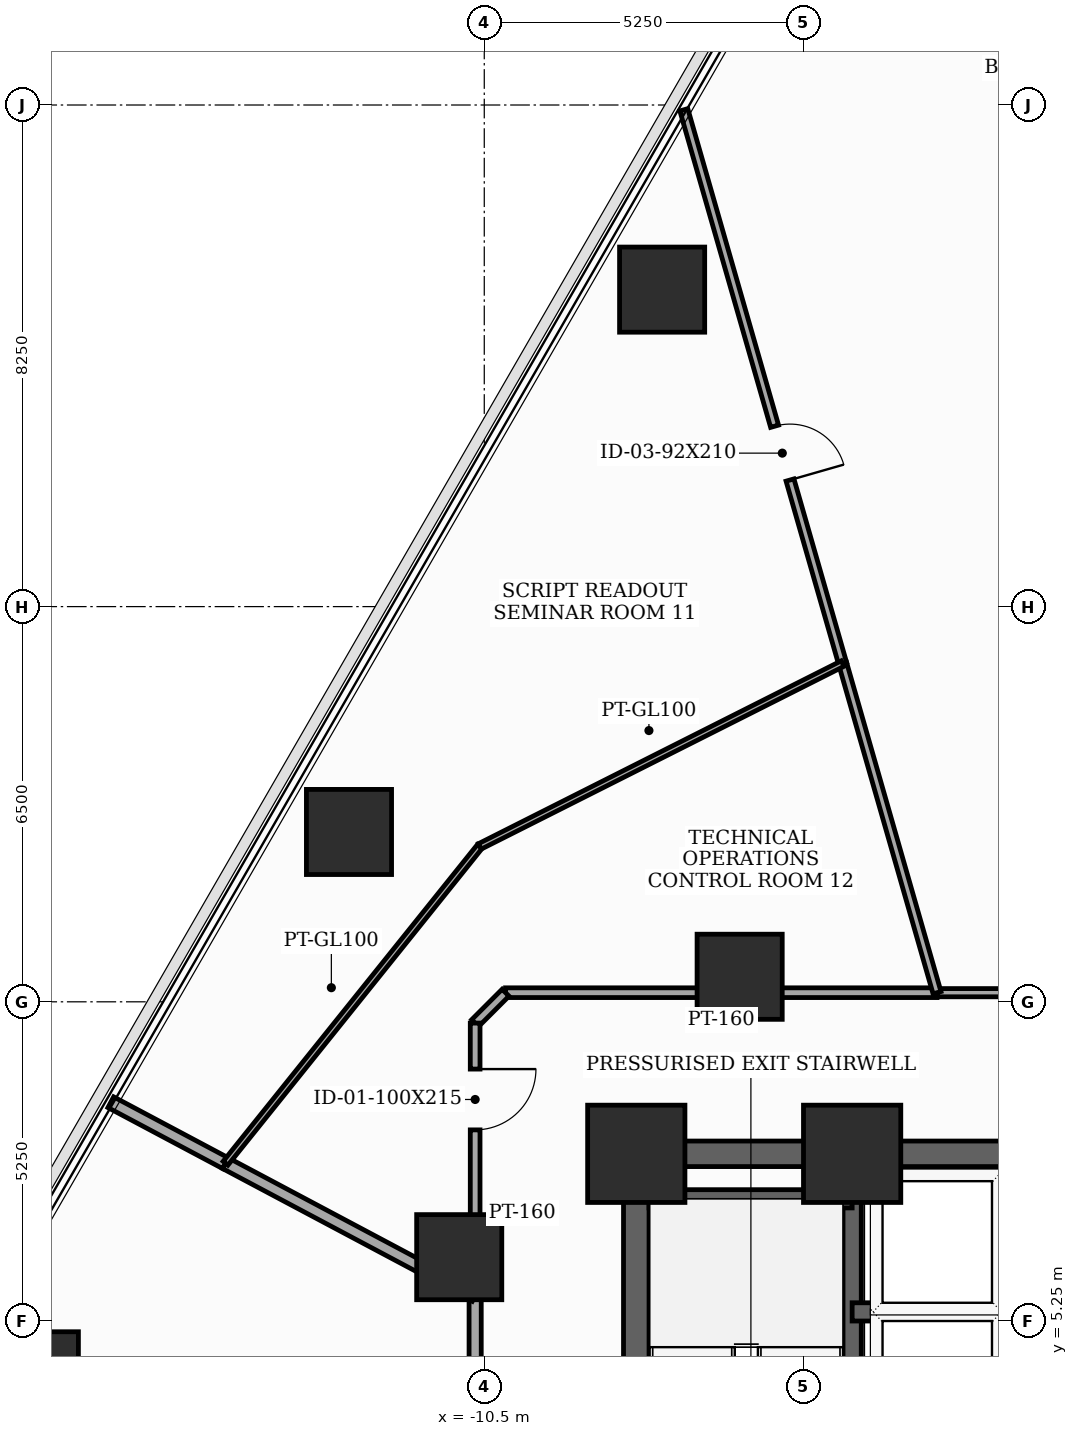
"""IFC4 building model, lengths in metres.
Left out: names, types, materials, properties, quantities, classifications, styles, units other than length and angle.
Written with IfcOpenShell. Run it as: python <this file> out.ifc"""

import sys

from ifc_helpers import new_model, si_unit, direction, frame, frame_2d, origin, origin_2d, place, context, subcontext, project, spatial, rectangle, extrude, element, fill, save


model = new_model("IFC4")
c1 = context("Model", 3, precision=1e-05, world=origin(), true_north=direction((0.0, 1.0)))
c2 = subcontext(c1, "Body", "Model", "MODEL_VIEW")
j1 = project(units=[si_unit("LENGTHUNIT", "METRE"), si_unit("PLANEANGLEUNIT", "RADIAN")], contexts=[c1])
p1 = place(None, origin())
s1 = spatial("IfcSite", under=j1, at=p1, CompositionType="ELEMENT")
p2 = place(p1, origin())
s2 = spatial("IfcBuilding", under=s1, at=p2, CompositionType="ELEMENT")
p3 = place(p2, frame((0.0, 0.0, 44.5)))
s3 = spatial("IfcBuildingStorey", under=s2, at=p3, CompositionType="ELEMENT", Elevation=44.5)
for number, where, z_axis, x_axis in (
    (1, (-4.45, 8.0, 0.0), (0.0, 0.0, 1.0), (1.0, 0.0, 0.0)),
    (2, (-8.0, 8.0, 0.0), (0.0, 0.0, 1.0), (1.0, 0.0, 0.0)),
):
    element("IfcColumn", number, at=place(p3, frame(where, z_axis=z_axis, x_axis=x_axis)), inside=s3, PredefinedType="COLUMN", context=c2, shape_type="SweptSolid", body=[
        extrude(rectangle(XDim=1.6, YDim=1.6, at=origin_2d()), origin(), (0.0, 0.0, 1.0), 3.7),
    ])
for number, where, z_axis, x_axis in (
    (3, (-6.3, 10.912, 0.0), (0.0, 0.0, 1.0), (1.0, 0.0, 0.0)),
    (4, (-10.912, 6.3, 0.0), (0.0, 0.0, 1.0), (1.0, 0.0, 0.0)),
    (5, (-7.575, 22.213, 0.0), (0.0, 0.0, 1.0), (1.0, 0.0, 0.0)),
    (6, (-12.725, 13.293, 0.0), (0.0, 0.0, 1.0), (1.0, 0.0, 0.0)),
    (7, (-17.875, 4.373, 0.0), (0.0, 0.0, 1.0), (1.0, 0.0, 0.0)),
):
    element("IfcColumn", number, at=place(p3, frame(where, z_axis=z_axis, x_axis=x_axis)), inside=s3, PredefinedType="COLUMN", context=c2, shape_type="SweptSolid", body=[
        extrude(rectangle(XDim=1.4, YDim=1.4, at=origin_2d()), origin(), (0.0, 0.0, 1.0), 3.7),
    ])
p4 = place(p3, frame((-8.0, -8.0, 0.0), z_axis=(0.0, 0.0, 1.0), x_axis=(0.0, 1.0, 0.0)))
e8 = element("IfcWall", 8, at=p4, inside=s3, PredefinedType="SHEAR", context=c2, shape_type="SweptSolid", body=[
    extrude(rectangle(XDim=16.0, YDim=0.42, at=frame_2d((8.0, 0.0))), origin(), (0.0, 0.0, 1.0), 3.5),
])
p5 = place(p4, frame((1.002, 0.0, 0.0)))
e9 = element("IfcOpeningElement", 9, at=p5, cuts=e8, PredefinedType="OPENING", context=c2, shape_type="SweptSolid", body=[
    extrude(rectangle(XDim=0.85, YDim=2.02, at=frame_2d((0.425, 1.01))), frame((0.0, 0.22, 0.0), z_axis=(0.0, -1.0, 0.0), x_axis=(1.0, 0.0, 0.0)), (0.0, 0.0, 1.0), 0.44),
])
p6 = place(p4, frame((5.35, 0.0, 0.0)))
e10 = element("IfcOpeningElement", 10, at=p6, cuts=e8, PredefinedType="OPENING", context=c2, shape_type="SweptSolid", body=[
    extrude(rectangle(XDim=1.05, YDim=2.15, at=frame_2d((0.525, 1.075))), frame((0.0, 0.22, 0.0), z_axis=(0.0, -1.0, 0.0), x_axis=(1.0, 0.0, 0.0)), (0.0, 0.0, 1.0), 0.44),
])
p7 = place(p3, frame((-8.0, 8.0, 0.0), z_axis=(0.0, 0.0, 1.0), x_axis=(1.0, 0.0, 0.0)))
e11 = element("IfcWall", 11, at=p7, inside=s3, PredefinedType="SHEAR", context=c2, shape_type="SweptSolid", body=[
    extrude(rectangle(XDim=16.0, YDim=0.42, at=frame_2d((8.0, 0.0))), origin(), (0.0, 0.0, 1.0), 3.5),
])
p8 = place(p7, frame((7.1, 0.0, 0.0)))
e12 = element("IfcOpeningElement", 12, at=p8, cuts=e11, PredefinedType="OPENING", context=c2, shape_type="SweptSolid", body=[
    extrude(rectangle(XDim=1.8, YDim=2.15, at=frame_2d((0.9, 1.075))), frame((0.0, 0.22, 0.0), z_axis=(0.0, -1.0, 0.0), x_axis=(1.0, 0.0, 0.0)), (0.0, 0.0, 1.0), 0.44),
])
p9 = place(p3, frame((-4.45, -7.79, 0.0), z_axis=(0.0, 0.0, 1.0), x_axis=(0.0, 1.0, 0.0)))
e13 = element("IfcWall", 13, at=p9, inside=s3, PredefinedType="SHEAR", context=c2, shape_type="SweptSolid", body=[
    extrude(rectangle(XDim=15.58, YDim=0.3, at=frame_2d((7.79, 0.0))), origin(), (0.0, 0.0, 1.0), 3.5),
])
p10 = place(p3, frame((-7.79, 7.26, 0.0), z_axis=(0.0, 0.0, 1.0), x_axis=(1.0, 0.0, 0.0)))
e14 = element("IfcWall", 14, at=p10, inside=s3, PredefinedType="SHEAR", context=c2, shape_type="SweptSolid", body=[
    extrude(rectangle(XDim=3.34, YDim=0.3, at=frame_2d((1.67, 0.0))), origin(), (0.0, 0.0, 1.0), 3.5),
])
p11 = place(p3, frame((-4.45, 5.4, 0.0), z_axis=(0.0, 0.0, 1.0), x_axis=(1.0, 0.0, 0.0)))
e15 = element("IfcWall", 15, at=p11, inside=s3, PredefinedType="SHEAR", context=c2, shape_type="SweptSolid", body=[
    extrude(rectangle(XDim=2.77, YDim=0.3, at=frame_2d((1.385, 0.0))), origin(), (0.0, 0.0, 1.0), 3.5),
])
p12 = place(p3, frame((1.715, 10.65, 0.0), z_axis=(0.0, 0.0, 1.0), x_axis=(-1.0, 0.0, 0.0)))
e16 = element("IfcWall", 16, at=p12, inside=s3, PredefinedType="PARTITIONING", context=c2, shape_type="SweptSolid", body=[
    extrude(rectangle(XDim=4.769, YDim=0.135, at=frame_2d((2.385, 0.0))), origin(), (0.0, 0.0, 1.0), 2.785),
])
p13 = place(p3, frame((-10.65, 5.663, 0.0), z_axis=(0.0, 0.0, 1.0), x_axis=(0.0, -1.0, 0.0)))
e17 = element("IfcWall", 17, at=p13, inside=s3, PredefinedType="SOLIDWALL", context=c2, shape_type="SweptSolid", body=[
    extrude(rectangle(XDim=7.378, YDim=0.2, at=frame_2d((3.689, 0.0))), origin(), (0.0, 0.0, 1.0), 2.785),
])
p14 = place(p3, frame((-3.054, 10.65, 0.0), z_axis=(0.0, 0.0, 1.0), x_axis=(-1.0, 0.0, 0.0)))
e18 = element("IfcWall", 18, at=p14, inside=s3, PredefinedType="PARTITIONING", context=c2, shape_type="SweptSolid", body=[
    extrude(rectangle(XDim=7.096, YDim=0.16, at=frame_2d((3.548, 0.0))), origin(), (0.0, 0.0, 1.0), 2.685),
])
p15 = place(p3, frame((-10.15, 10.65, 0.0), z_axis=(0.0, 0.0, 1.0), x_axis=(-0.707106781187, -0.707106781187, 0.0)))
e19 = element("IfcWall", 19, at=p15, inside=s3, PredefinedType="PARTITIONING", context=c2, shape_type="SweptSolid", body=[
    extrude(rectangle(XDim=0.707, YDim=0.16, at=frame_2d((0.354, 0.0))), origin(), (0.0, 0.0, 1.0), 3.5),
])
p16 = place(p3, frame((-10.65, 10.15, 0.0), z_axis=(0.0, 0.0, 1.0), x_axis=(0.0, -1.0, 0.0)))
e20 = element("IfcWall", 20, at=p16, inside=s3, PredefinedType="PARTITIONING", context=c2, shape_type="SweptSolid", body=[
    extrude(rectangle(XDim=4.487, YDim=0.16, at=frame_2d((2.243, 0.0))), origin(), (0.0, 0.0, 1.0), 2.785),
])
p17 = place(p16, frame((0.756, 0.0, 0.0)))
e21 = element("IfcOpeningElement", 21, at=p17, cuts=e20, PredefinedType="OPENING", context=c2, shape_type="SweptSolid", body=[
    extrude(rectangle(XDim=1.0, YDim=2.15, at=frame_2d((0.5, 1.075))), frame((0.0, 0.09, 0.0), z_axis=(0.0, -1.0, 0.0), x_axis=(1.0, 0.0, 0.0)), (0.0, 0.0, 1.0), 0.18),
])
p18 = place(p3, frame((-7.218, 25.171, 0.0), z_axis=(0.0, 0.0, 1.0), x_axis=(0.275694254482, -0.961245378686, 0.0)))
e22 = element("IfcWall", 22, at=p18, inside=s3, PredefinedType="PARTITIONING", context=c2, shape_type="SweptSolid", body=[
    extrude(rectangle(XDim=9.475, YDim=0.135, at=frame_2d((4.738, 0.0))), origin(), (0.0, 0.0, 1.0), 2.935),
])
p19 = place(p18, frame((5.415, 0.0, 0.0)))
e23 = element("IfcOpeningElement", 23, at=p19, cuts=e22, PredefinedType="OPENING", context=c2, shape_type="SweptSolid", body=[
    extrude(rectangle(XDim=0.92, YDim=2.1, at=frame_2d((0.46, 1.05))), frame((0.0, 0.077, 0.0), z_axis=(0.0, -1.0, 0.0), x_axis=(1.0, 0.0, 0.0)), (0.0, 0.0, 1.0), 0.155),
])
p20 = place(p3, frame((-4.606, 16.063, 0.0), z_axis=(0.0, 0.0, 1.0), x_axis=(0.275608564, -0.961269951392, 0.0)))
e24 = element("IfcWall", 24, at=p20, inside=s3, PredefinedType="PARTITIONING", context=c2, shape_type="SweptSolid", body=[
    extrude(rectangle(XDim=5.631, YDim=0.135, at=frame_2d((2.815, 0.0))), origin(), (0.0, 0.0, 1.0), 2.785),
])
p21 = place(p3, frame((-14.755, 7.845, 0.0), z_axis=(0.0, 0.0, 1.0), x_axis=(-0.882905636776, 0.469550462197, 0.0)))
e25 = element("IfcWall", 25, at=p21, inside=s3, PredefinedType="SOLIDWALL", context=c2, shape_type="SweptSolid", body=[
    extrude(rectangle(XDim=2.137, YDim=0.2, at=frame_2d((1.069, 0.0))), origin(), (0.0, 0.0, 1.0), 2.935),
])
p22 = place(p3, frame((-10.65, 5.663, 0.0), z_axis=(0.0, 0.0, 1.0), x_axis=(-0.883016425854, 0.46934208385, 0.0)))
e26 = element("IfcWall", 26, at=p22, inside=s3, PredefinedType="SOLIDWALL", context=c2, shape_type="SweptSolid", body=[
    extrude(rectangle(XDim=4.649, YDim=0.2, at=frame_2d((2.324, 0.0))), origin(), (0.0, 0.0, 1.0), 2.785),
])
p23 = place(p3, frame((-14.755, 7.845, 0.0), z_axis=(0.0, 0.0, 1.0), x_axis=(0.625893000506, 0.779908938222, 0.0)))
e27 = element("IfcWall", 27, at=p23, inside=s3, PredefinedType="MOVABLE", context=c2, shape_type="SweptSolid", body=[
    extrude(rectangle(XDim=6.681, YDim=0.1, at=frame_2d((3.341, 0.0))), origin(), (0.0, 0.0, 1.0), 2.685),
])
p24 = place(p3, frame((-10.573, 13.056, 0.0), z_axis=(0.0, 0.0, 1.0), x_axis=(0.893012396789, 0.450032064615, 0.0)))
e28 = element("IfcWall", 28, at=p24, inside=s3, PredefinedType="MOVABLE", context=c2, shape_type="SweptSolid", body=[
    extrude(rectangle(XDim=6.682, YDim=0.1, at=frame_2d((3.341, 0.0))), origin(), (0.0, 0.0, 1.0), 2.685),
])
p25 = place(p17, origin())
e29 = element("IfcDoor", 29, at=p25, inside=s3, OperationType="SINGLE_SWING_LEFT", PredefinedType="DOOR", context=c2, shape_type="SweptSolid", body=[
    extrude(rectangle(XDim=1.0, YDim=2.15, at=frame_2d((0.5, 1.075))), frame((0.0, 0.025, 0.0), z_axis=(0.0, -1.0, 0.0), x_axis=(1.0, 0.0, 0.0)), (0.0, 0.0, 1.0), 0.05),
])
fill(e21, e29)
p26 = place(p19, origin())
e30 = element("IfcDoor", 30, at=p26, inside=s3, OperationType="SINGLE_SWING_RIGHT", PredefinedType="DOOR", context=c2, shape_type="SweptSolid", body=[
    extrude(rectangle(XDim=0.92, YDim=2.1, at=frame_2d((0.46, 1.05))), frame((0.0, 0.025, 0.0), z_axis=(0.0, -1.0, 0.0), x_axis=(1.0, 0.0, 0.0)), (0.0, 0.0, 1.0), 0.05),
])
fill(e23, e30)
save(model, sys.argv[1])
